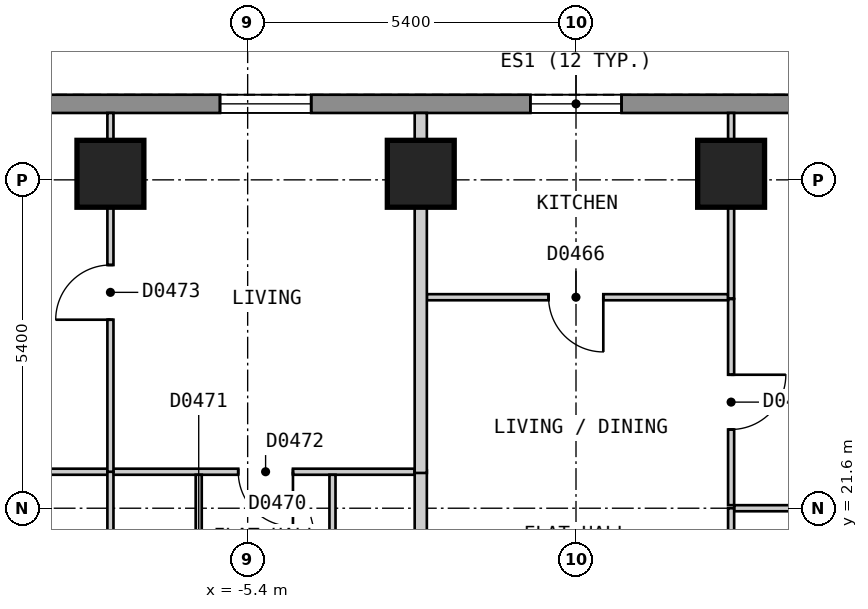
"""IFC4 building model, lengths in metres.
Left out: names, types, materials, properties, quantities, classifications, styles, units other than length and angle.
Written with IfcOpenShell. Run it as: python <this file> out.ifc"""

import sys

from ifc_helpers import new_model, si_unit, direction, frame, frame_2d, origin, origin_2d, place, context, subcontext, project, spatial, polyline, rectangle, outline, extrude, element, fill, save


model = new_model("IFC4")
c1 = context("Model", 3, precision=1e-05, world=origin(), true_north=direction((0.0, 1.0)))
c2 = subcontext(c1, "Body", "Model", "MODEL_VIEW")
j1 = project(units=[si_unit("LENGTHUNIT", "METRE"), si_unit("PLANEANGLEUNIT", "RADIAN")], contexts=[c1])
p1 = place(None, origin())
s1 = spatial("IfcSite", under=j1, at=p1, CompositionType="ELEMENT")
p2 = place(p1, origin())
s2 = spatial("IfcBuilding", under=s1, at=p2, CompositionType="ELEMENT")
p3 = place(p2, frame((0.0, 0.0, 38.4)))
s3 = spatial("IfcBuildingStorey", under=s2, at=p3, CompositionType="ELEMENT", Elevation=38.4)
for number, where, z_axis, x_axis in (
    (1, (2.551, 27.1, 0.0), (0.0, 0.0, 1.0), (-1.0, 0.0, 0.0)),
    (2, (-2.553, 27.1, 0.0), (0.0, 0.0, 1.0), (-1.0, 0.0, 0.0)),
    (3, (-7.657, 27.1, 0.0), (0.0, 0.0, 1.0), (-1.0, 0.0, 0.0)),
):
    element("IfcColumn", number, at=place(p3, frame(where, z_axis=z_axis, x_axis=x_axis)), inside=s3, PredefinedType="COLUMN", context=c2, shape_type="SweptSolid", body=[
        extrude(rectangle(XDim=1.1, YDim=1.1, at=origin_2d()), origin(), (0.0, 0.0, 1.0), 3.0),
    ])
p4 = place(p3, frame((13.51, 28.25, 0.0), z_axis=(0.0, 0.0, 1.0), x_axis=(-1.0, 0.0, 0.0)))
e4 = element("IfcWall", 4, at=p4, inside=s3, PredefinedType="SOLIDWALL", context=c2, shape_type="SweptSolid", body=[
    extrude(outline(polyline([(0.0, -0.15), (27.02, -0.15), (26.94, 0.15), (0.08, 0.15), (0.0, -0.15)])), origin(), (0.0, 0.0, 1.0), 2.7),
])
p5 = place(p4, frame((2.553, 0.0, 0.15)))
e5 = element("IfcOpeningElement", 5, at=p5, cuts=e4, PredefinedType="OPENING", context=c2, shape_type="SweptSolid", body=[
    extrude(rectangle(XDim=1.5, YDim=2.1, at=frame_2d((0.75, 1.05))), frame((0.0, 0.16, 0.0), z_axis=(0.0, -1.0, 0.0), x_axis=(1.0, 0.0, 0.0)), (0.0, 0.0, 1.0), 0.32),
])
p6 = place(p4, frame((7.657, 0.0, 0.15)))
e6 = element("IfcOpeningElement", 6, at=p6, cuts=e4, PredefinedType="OPENING", context=c2, shape_type="SweptSolid", body=[
    extrude(rectangle(XDim=1.5, YDim=2.1, at=frame_2d((0.75, 1.05))), frame((0.0, 0.16, 0.0), z_axis=(0.0, -1.0, 0.0), x_axis=(1.0, 0.0, 0.0)), (0.0, 0.0, 1.0), 0.32),
])
p7 = place(p4, frame((12.761, 0.0, 0.15)))
e7 = element("IfcOpeningElement", 7, at=p7, cuts=e4, PredefinedType="OPENING", context=c2, shape_type="SweptSolid", body=[
    extrude(rectangle(XDim=1.5, YDim=2.1, at=frame_2d((0.75, 1.05))), frame((0.0, 0.16, 0.0), z_axis=(0.0, -1.0, 0.0), x_axis=(1.0, 0.0, 0.0)), (0.0, 0.0, 1.0), 0.32),
])
p8 = place(p4, frame((17.865, 0.0, 0.15)))
e8 = element("IfcOpeningElement", 8, at=p8, cuts=e4, PredefinedType="OPENING", context=c2, shape_type="SweptSolid", body=[
    extrude(rectangle(XDim=1.5, YDim=2.1, at=frame_2d((0.75, 1.05))), frame((0.0, 0.16, 0.0), z_axis=(0.0, -1.0, 0.0), x_axis=(1.0, 0.0, 0.0)), (0.0, 0.0, 1.0), 0.32),
])
p9 = place(p4, frame((22.969, 0.0, 0.15)))
e9 = element("IfcOpeningElement", 9, at=p9, cuts=e4, PredefinedType="OPENING", context=c2, shape_type="SweptSolid", body=[
    extrude(rectangle(XDim=1.5, YDim=2.1, at=frame_2d((0.75, 1.05))), frame((0.0, 0.16, 0.0), z_axis=(0.0, -1.0, 0.0), x_axis=(1.0, 0.0, 0.0)), (0.0, 0.0, 1.0), 0.32),
])
p10 = place(p3, frame((2.551, 25.04, 0.0), z_axis=(0.0, 0.0, 1.0), x_axis=(0.0, -1.0, 0.0)))
e10 = element("IfcWall", 10, at=p10, inside=s3, PredefinedType="PARTITIONING", context=c2, shape_type="SweptSolid", body=[
    extrude(rectangle(XDim=3.39, YDim=0.1, at=frame_2d((1.695, 0.0))), origin(), (0.0, 0.0, 1.0), 2.7),
])
p11 = place(p10, frame((1.245, 0.0, 0.0)))
e11 = element("IfcOpeningElement", 11, at=p11, cuts=e10, PredefinedType="OPENING", context=c2, shape_type="SweptSolid", body=[
    extrude(rectangle(XDim=0.9, YDim=2.1, at=frame_2d((0.45, 1.05))), frame((0.0, 0.06, 0.0), z_axis=(0.0, -1.0, 0.0), x_axis=(1.0, 0.0, 0.0)), (0.0, 0.0, 1.0), 0.12),
])
p12 = place(p3, frame((2.601, 21.6, 0.0), z_axis=(0.0, 0.0, 1.0), x_axis=(1.0, 0.0, 0.0)))
e12 = element("IfcWall", 12, at=p12, inside=s3, PredefinedType="PARTITIONING", context=c2, shape_type="SweptSolid", body=[
    extrude(rectangle(XDim=4.954, YDim=0.1, at=frame_2d((2.477, 0.0))), origin(), (0.0, 0.0, 1.0), 2.7),
])
p13 = place(p12, frame((2.102, 0.0, 0.0)))
e13 = element("IfcOpeningElement", 13, at=p13, cuts=e12, PredefinedType="OPENING", context=c2, shape_type="SweptSolid", body=[
    extrude(rectangle(XDim=0.8, YDim=2.1, at=frame_2d((0.4, 1.05))), frame((0.0, 0.06, 0.0), z_axis=(0.0, -1.0, 0.0), x_axis=(1.0, 0.0, 0.0)), (0.0, 0.0, 1.0), 0.12),
])
p14 = place(p3, frame((-12.711, 22.2, 0.0), z_axis=(0.0, 0.0, 1.0), x_axis=(1.0, 0.0, 0.0)))
e14 = element("IfcWall", 14, at=p14, inside=s3, PredefinedType="PARTITIONING", context=c2, shape_type="SweptSolid", body=[
    extrude(rectangle(XDim=10.058, YDim=0.1, at=frame_2d((5.029, 0.0))), origin(), (0.0, 0.0, 1.0), 2.7),
])
p15 = place(p14, frame((7.156, 0.0, 0.0)))
e15 = element("IfcOpeningElement", 15, at=p15, cuts=e14, PredefinedType="OPENING", context=c2, shape_type="SweptSolid", body=[
    extrude(rectangle(XDim=0.9, YDim=2.1, at=frame_2d((0.45, 1.05))), frame((0.0, 0.06, 0.0), z_axis=(0.0, -1.0, 0.0), x_axis=(1.0, 0.0, 0.0)), (0.0, 0.0, 1.0), 0.12),
])
p16 = place(p14, frame((2.102, 0.0, 0.0)))
e16 = element("IfcOpeningElement", 16, at=p16, cuts=e14, PredefinedType="OPENING", context=c2, shape_type="SweptSolid", body=[
    extrude(rectangle(XDim=0.8, YDim=2.1, at=frame_2d((0.4, 1.05))), frame((0.0, 0.06, 0.0), z_axis=(0.0, -1.0, 0.0), x_axis=(1.0, 0.0, 0.0)), (0.0, 0.0, 1.0), 0.12),
])
p17 = place(p3, frame((-2.453, 25.07, 0.0), z_axis=(0.0, 0.0, 1.0), x_axis=(1.0, 0.0, 0.0)))
e17 = element("IfcWall", 17, at=p17, inside=s3, PredefinedType="PARTITIONING", context=c2, shape_type="SweptSolid", body=[
    extrude(rectangle(XDim=4.954, YDim=0.1, at=frame_2d((2.477, 0.0))), origin(), (0.0, 0.0, 1.0), 2.7),
])
p18 = place(p17, frame((2.002, 0.0, 0.0)))
e18 = element("IfcOpeningElement", 18, at=p18, cuts=e17, PredefinedType="OPENING", context=c2, shape_type="SweptSolid", body=[
    extrude(rectangle(XDim=0.9, YDim=2.1, at=frame_2d((0.45, 1.05))), frame((0.0, 0.06, 0.0), z_axis=(0.0, -1.0, 0.0), x_axis=(1.0, 0.0, 0.0)), (0.0, 0.0, 1.0), 0.12),
])
p19 = place(p3, frame((2.551, 18.1, 0.0), z_axis=(0.0, 0.0, 1.0), x_axis=(0.0, 1.0, 0.0)))
e19 = element("IfcWall", 19, at=p19, inside=s3, PredefinedType="PARTITIONING", context=c2, shape_type="SweptSolid", body=[
    extrude(rectangle(XDim=3.5, YDim=0.1, at=frame_2d((1.75, 0.0))), origin(), (0.0, 0.0, 1.0), 2.7),
])
p20 = place(p3, frame((2.551, 25.05, 0.0), z_axis=(0.0, 0.0, 1.0), x_axis=(0.0, 1.0, 0.0)))
e20 = element("IfcWall", 20, at=p20, inside=s3, PredefinedType="PARTITIONING", context=c2, shape_type="SweptSolid", body=[
    extrude(rectangle(XDim=3.05, YDim=0.1, at=frame_2d((1.525, 0.0))), origin(), (0.0, 0.0, 1.0), 2.7),
])
p21 = place(p3, frame((-4.005, 18.1, 0.0), z_axis=(0.0, 0.0, 1.0), x_axis=(0.0, 1.0, 0.0)))
e21 = element("IfcWall", 21, at=p21, inside=s3, PredefinedType="PARTITIONING", context=c2, shape_type="SweptSolid", body=[
    extrude(rectangle(XDim=4.05, YDim=0.1, at=frame_2d((2.025, 0.0))), origin(), (0.0, 0.0, 1.0), 2.7),
])
p22 = place(p21, frame((1.6, 0.0, 0.0)))
e22 = element("IfcOpeningElement", 22, at=p22, cuts=e21, PredefinedType="OPENING", context=c2, shape_type="SweptSolid", body=[
    extrude(rectangle(XDim=0.8, YDim=2.1, at=frame_2d((0.4, 1.05))), frame((0.0, 0.06, 0.0), z_axis=(0.0, -1.0, 0.0), x_axis=(1.0, 0.0, 0.0)), (0.0, 0.0, 1.0), 0.12),
])
p23 = place(p3, frame((-6.205, 18.1, 0.0), z_axis=(0.0, 0.0, 1.0), x_axis=(0.0, 1.0, 0.0)))
e23 = element("IfcWall", 23, at=p23, inside=s3, PredefinedType="PARTITIONING", context=c2, shape_type="SweptSolid", body=[
    extrude(rectangle(XDim=4.05, YDim=0.1, at=frame_2d((2.025, 0.0))), origin(), (0.0, 0.0, 1.0), 2.7),
])
p24 = place(p23, frame((1.55, 0.0, 0.0)))
e24 = element("IfcOpeningElement", 24, at=p24, cuts=e23, PredefinedType="OPENING", context=c2, shape_type="SweptSolid", body=[
    extrude(rectangle(XDim=0.9, YDim=2.1, at=frame_2d((0.45, 1.05))), frame((0.0, 0.06, 0.0), z_axis=(0.0, -1.0, 0.0), x_axis=(1.0, 0.0, 0.0)), (0.0, 0.0, 1.0), 0.12),
])
p25 = place(p3, frame((-7.657, 18.1, 0.0), z_axis=(0.0, 0.0, 1.0), x_axis=(0.0, 1.0, 0.0)))
e25 = element("IfcWall", 25, at=p25, inside=s3, PredefinedType="PARTITIONING", context=c2, shape_type="SweptSolid", body=[
    extrude(rectangle(XDim=4.1, YDim=0.1, at=frame_2d((2.05, 0.0))), origin(), (0.0, 0.0, 1.0), 2.7),
])
p26 = place(p3, frame((-2.553, 22.22, 0.0), z_axis=(0.0, 0.0, 1.0), x_axis=(0.0, -1.0, 0.0)))
e26 = element("IfcWall", 26, at=p26, inside=s3, PredefinedType="PARTITIONING", context=c2, shape_type="SweptSolid", body=[
    extrude(rectangle(XDim=1.56, YDim=0.2, at=frame_2d((0.78, 0.0))), origin(), (0.0, 0.0, 1.0), 2.7),
])
p27 = place(p3, frame((-2.553, 22.18, 0.0), z_axis=(0.0, 0.0, 1.0), x_axis=(0.0, 1.0, 0.0)))
e27 = element("IfcWall", 27, at=p27, inside=s3, PredefinedType="PARTITIONING", context=c2, shape_type="SweptSolid", body=[
    extrude(rectangle(XDim=5.92, YDim=0.2, at=frame_2d((2.96, 0.0))), origin(), (0.0, 0.0, 1.0), 2.7),
])
p28 = place(p3, frame((-7.657, 22.2, 0.0), z_axis=(0.0, 0.0, 1.0), x_axis=(0.0, 1.0, 0.0)))
e28 = element("IfcWall", 28, at=p28, inside=s3, PredefinedType="PARTITIONING", context=c2, shape_type="SweptSolid", body=[
    extrude(rectangle(XDim=5.9, YDim=0.1, at=frame_2d((2.95, 0.0))), origin(), (0.0, 0.0, 1.0), 2.7),
])
p29 = place(p28, frame((2.5, 0.0, 0.0)))
e29 = element("IfcOpeningElement", 29, at=p29, cuts=e28, PredefinedType="OPENING", context=c2, shape_type="SweptSolid", body=[
    extrude(rectangle(XDim=0.9, YDim=2.1, at=frame_2d((0.45, 1.05))), frame((0.0, 0.06, 0.0), z_axis=(0.0, -1.0, 0.0), x_axis=(1.0, 0.0, 0.0)), (0.0, 0.0, 1.0), 0.12),
])
p30 = place(p7, origin())
e30 = element("IfcWindow", 30, at=p30, inside=s3, PartitioningType="SINGLE_PANEL", PredefinedType="WINDOW", context=c2, shape_type="SweptSolid", body=[
    extrude(rectangle(XDim=1.5, YDim=2.1, at=frame_2d((0.75, 1.05))), frame((0.0, 0.03, 0.0), z_axis=(0.0, -1.0, 0.0), x_axis=(1.0, 0.0, 0.0)), (0.0, 0.0, 1.0), 0.06),
])
fill(e7, e30)
p31 = place(p8, origin())
e31 = element("IfcWindow", 31, at=p31, inside=s3, PartitioningType="SINGLE_PANEL", PredefinedType="WINDOW", context=c2, shape_type="SweptSolid", body=[
    extrude(rectangle(XDim=1.5, YDim=2.1, at=frame_2d((0.75, 1.05))), frame((0.0, 0.03, 0.0), z_axis=(0.0, -1.0, 0.0), x_axis=(1.0, 0.0, 0.0)), (0.0, 0.0, 1.0), 0.06),
])
fill(e8, e31)
p32 = place(p18, origin())
e32 = element("IfcDoor", 32, at=p32, inside=s3, OperationType="SINGLE_SWING_RIGHT", PredefinedType="DOOR", context=c2, shape_type="SweptSolid", body=[
    extrude(rectangle(XDim=0.9, YDim=2.1, at=frame_2d((0.45, 1.05))), frame((0.0, 0.025, 0.0), z_axis=(0.0, -1.0, 0.0), x_axis=(1.0, 0.0, 0.0)), (0.0, 0.0, 1.0), 0.05),
])
fill(e18, e32)
p33 = place(p11, origin())
e33 = element("IfcDoor", 33, at=p33, inside=s3, OperationType="SINGLE_SWING_LEFT", PredefinedType="DOOR", context=c2, shape_type="SweptSolid", body=[
    extrude(rectangle(XDim=0.9, YDim=2.1, at=frame_2d((0.45, 1.05))), frame((0.0, 0.025, 0.0), z_axis=(0.0, -1.0, 0.0), x_axis=(1.0, 0.0, 0.0)), (0.0, 0.0, 1.0), 0.05),
])
fill(e11, e33)
p34 = place(p15, origin())
e34 = element("IfcDoor", 34, at=p34, inside=s3, OperationType="SINGLE_SWING_RIGHT", PredefinedType="DOOR", context=c2, shape_type="SweptSolid", body=[
    extrude(rectangle(XDim=0.9, YDim=2.1, at=frame_2d((0.45, 1.05))), frame((0.0, 0.025, 0.0), z_axis=(0.0, -1.0, 0.0), x_axis=(1.0, 0.0, 0.0)), (0.0, 0.0, 1.0), 0.05),
])
fill(e15, e34)
p35 = place(p29, origin())
e35 = element("IfcDoor", 35, at=p35, inside=s3, OperationType="SINGLE_SWING_LEFT", PredefinedType="DOOR", context=c2, shape_type="SweptSolid", body=[
    extrude(rectangle(XDim=0.9, YDim=2.1, at=frame_2d((0.45, 1.05))), frame((0.0, 0.025, 0.0), z_axis=(0.0, -1.0, 0.0), x_axis=(1.0, 0.0, 0.0)), (0.0, 0.0, 1.0), 0.05),
])
fill(e29, e35)
save(model, sys.argv[1])
